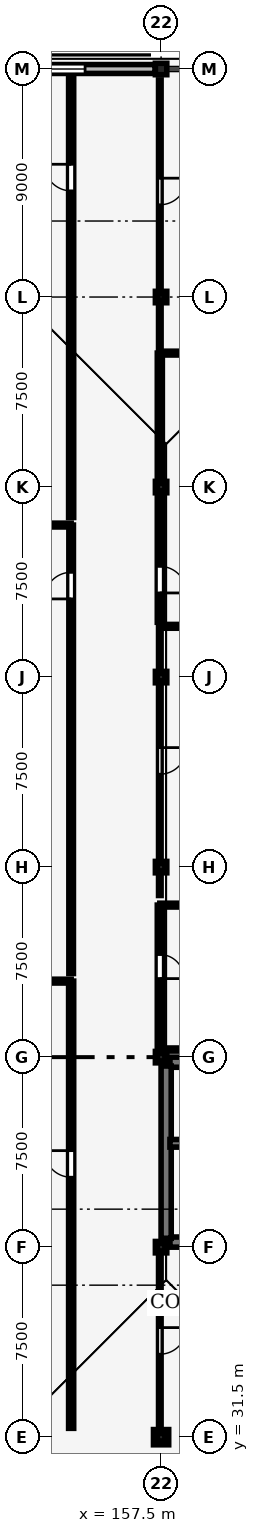
"""IFC4 building model, lengths in metres.
Left out: names, types, materials, properties, quantities, classifications, styles, units other than length and angle.
Written with IfcOpenShell. Run it as: python <this file> out.ifc"""

import sys

from ifc_helpers import new_model, si_unit, direction, frame, frame_2d, origin, origin_2d, place, context, subcontext, project, spatial, rectangle, i_section, extrude, element, fill, save


model = new_model("IFC4")
c1 = context("Model", 3, precision=1e-05, world=origin(), true_north=direction((0.0, 1.0)))
c2 = subcontext(c1, "Body", "Model", "MODEL_VIEW")
j1 = project(units=[si_unit("LENGTHUNIT", "METRE"), si_unit("PLANEANGLEUNIT", "RADIAN")], contexts=[c1])
p1 = place(None, origin())
s1 = spatial("IfcSite", under=j1, at=p1, CompositionType="ELEMENT")
p2 = place(p1, origin())
s2 = spatial("IfcBuilding", under=s1, at=p2, CompositionType="ELEMENT")
p3 = place(p2, frame((0.0, 0.0, 9.3)))
s3 = spatial("IfcBuildingStorey", under=s2, at=p3, CompositionType="ELEMENT", Elevation=9.3)
p4 = place(p3, frame((157.5, 31.5, 0.0), z_axis=(0.0, 0.0, 1.0), x_axis=(1.0, 0.0, 0.0)))
e1 = element("IfcColumn", 1, at=p4, inside=s3, PredefinedType="COLUMN", context=c2, shape_type="SweptSolid", body=[
    extrude(rectangle(XDim=0.6, YDim=0.6, at=origin_2d()), origin(), (0.0, 0.0, 1.0), 4.8),
])
for number, where, z_axis, x_axis in (
    (2, (157.5, 39.0, 0.0), (0.0, 0.0, 1.0), (1.0, 0.0, 0.0)),
    (3, (157.5, 46.5, 0.0), (0.0, 0.0, 1.0), (1.0, 0.0, 0.0)),
    (4, (157.5, 54.0, 0.0), (0.0, 0.0, 1.0), (1.0, 0.0, 0.0)),
    (5, (157.5, 61.5, 0.0), (0.0, 0.0, 1.0), (1.0, 0.0, 0.0)),
    (6, (157.5, 69.0, 0.0), (0.0, 0.0, 1.0), (1.0, 0.0, 0.0)),
    (7, (157.5, 76.5, 0.0), (0.0, 0.0, 1.0), (1.0, 0.0, 0.0)),
    (8, (157.5, 85.5, 0.0), (0.0, 0.0, 1.0), (1.0, 0.0, 0.0)),
):
    element("IfcColumn", number, at=place(p3, frame(where, z_axis=z_axis, x_axis=x_axis)), inside=s3, PredefinedType="COLUMN", context=c2, shape_type="SweptSolid", body=[
        extrude(rectangle(XDim=0.45, YDim=0.45, at=origin_2d()), origin(), (0.0, 0.0, 1.0), 4.8),
    ])
p5 = place(p3, frame((157.5, 31.5, 4.8), z_axis=(0.0, 0.0, 1.0), x_axis=(1.0, 0.0, 0.0)))
e9 = element("IfcColumn", 9, at=p5, inside=s3, PredefinedType="COLUMN", context=c2, shape_type="SweptSolid", body=[
    extrude(i_section(OverallWidth=0.3, OverallDepth=0.3, WebThickness=0.011, FlangeThickness=0.019, FilletRadius=0.027, at=origin_2d()), origin(), (0.0, 0.0, 1.0), 2.24),
])
for number, where, z_axis, x_axis in (
    (10, (157.5, 39.0, 4.8), (0.0, 0.0, 1.0), (1.0, 0.0, 0.0)),
    (11, (157.5, 46.5, 4.8), (0.0, 0.0, 1.0), (1.0, 0.0, 0.0)),
    (12, (157.5, 54.0, 4.8), (0.0, 0.0, 1.0), (1.0, 0.0, 0.0)),
    (13, (157.5, 61.5, 4.8), (0.0, 0.0, 1.0), (1.0, 0.0, 0.0)),
    (14, (157.5, 69.0, 4.8), (0.0, 0.0, 1.0), (1.0, 0.0, 0.0)),
):
    element("IfcColumn", number, at=place(p3, frame(where, z_axis=z_axis, x_axis=x_axis)), inside=s3, PredefinedType="COLUMN", context=c2, shape_type="SweptSolid", body=[
        extrude(i_section(OverallWidth=0.3, OverallDepth=0.3, WebThickness=0.011, FlangeThickness=0.019, FilletRadius=0.027, at=origin_2d()), origin(), (0.0, 0.0, 1.0), 3.714),
    ])
p6 = place(p3, frame((157.5, 76.5, 4.8), z_axis=(0.0, 0.0, 1.0), x_axis=(1.0, 0.0, 0.0)))
e15 = element("IfcColumn", 15, at=p6, inside=s3, PredefinedType="COLUMN", context=c2, shape_type="SweptSolid", body=[
    extrude(i_section(OverallWidth=0.3, OverallDepth=0.3, WebThickness=0.011, FlangeThickness=0.019, FilletRadius=0.027, at=origin_2d()), origin(), (0.0, 0.0, 1.0), 2.338),
])
p7 = place(p3, frame((150.235, 85.5, 0.0), z_axis=(0.0, 0.0, 1.0), x_axis=(1.0, 0.0, 0.0)))
e16 = element("IfcWall", 16, at=p7, inside=s3, PredefinedType="STANDARD", context=c2, shape_type="SweptSolid", body=[
    extrude(rectangle(XDim=7.03, YDim=0.35, at=frame_2d((3.515, 0.0))), origin(), (0.0, 0.0, 1.0), 4.55),
])
p8 = place(p7, frame((2.765, 0.0, 0.9)))
e17 = element("IfcOpeningElement", 17, at=p8, cuts=e16, PredefinedType="OPENING", context=c2, shape_type="SweptSolid", body=[
    extrude(rectangle(XDim=1.5, YDim=2.1, at=frame_2d((0.75, 1.05))), frame((0.0, 0.185, 0.0), z_axis=(0.0, -1.0, 0.0), x_axis=(1.0, 0.0, 0.0)), (0.0, 0.0, 1.0), 0.37),
])
p9 = place(p3, frame((157.85, 39.2, 0.0), z_axis=(0.0, 0.0, 1.0), x_axis=(1.0, 0.0, 0.0)))
e18 = element("IfcWall", 18, at=p9, inside=s3, PredefinedType="SHEAR", context=c2, shape_type="SweptSolid", body=[
    extrude(rectangle(XDim=8.05, YDim=0.4, at=frame_2d((4.025, 0.0))), origin(), (0.0, 0.0, 1.0), 4.55),
])
p10 = place(p3, frame((157.85, 46.3, 0.0), z_axis=(0.0, 0.0, 1.0), x_axis=(1.0, 0.0, 0.0)))
e19 = element("IfcWall", 19, at=p10, inside=s3, PredefinedType="SHEAR", context=c2, shape_type="SweptSolid", body=[
    extrude(rectangle(XDim=14.3, YDim=0.4, at=frame_2d((7.15, 0.0))), origin(), (0.0, 0.0, 1.0), 4.55),
])
p11 = place(p3, frame((157.7, 39.35, 0.0), z_axis=(0.0, 0.0, 1.0), x_axis=(0.0, 1.0, 0.0)))
e20 = element("IfcWall", 20, at=p11, inside=s3, PredefinedType="SHEAR", context=c2, shape_type="SweptSolid", body=[
    extrude(rectangle(XDim=6.8, YDim=0.4, at=frame_2d((3.4, 0.0))), origin(), (0.0, 0.0, 1.0), 4.55),
])
p12 = place(p3, frame((157.85, 43.1, 0.0), z_axis=(0.0, 0.0, 1.0), x_axis=(1.0, 0.0, 0.0)))
e21 = element("IfcWall", 21, at=p12, inside=s3, PredefinedType="SHEAR", context=c2, shape_type="SweptSolid", body=[
    extrude(rectangle(XDim=8.05, YDim=0.3, at=frame_2d((4.025, 0.0))), origin(), (0.0, 0.0, 1.0), 4.55),
])
p13 = place(p3, frame((153.95, 31.85, 0.0), z_axis=(0.0, 0.0, 1.0), x_axis=(0.0, 1.0, 0.0)))
e22 = element("IfcWall", 22, at=p13, inside=s3, PredefinedType="STANDARD", context=c2, shape_type="SweptSolid", body=[
    extrude(rectangle(XDim=17.65, YDim=0.2, at=frame_2d((8.825, 0.0))), origin(), (0.0, 0.0, 1.0), 4.535),
])
p14 = place(p13, frame((9.91, 0.0, 0.0)))
e23 = element("IfcOpeningElement", 23, at=p14, cuts=e22, PredefinedType="OPENING", context=c2, shape_type="SweptSolid", body=[
    extrude(rectangle(XDim=1.05, YDim=2.2, at=frame_2d((0.525, 1.1))), frame((0.0, 0.11, 0.0), z_axis=(0.0, -1.0, 0.0), x_axis=(1.0, 0.0, 0.0)), (0.0, 0.0, 1.0), 0.22),
])
p15 = place(p3, frame((153.95, 49.8, 0.0), z_axis=(0.0, 0.0, 1.0), x_axis=(0.0, 1.0, 0.0)))
e24 = element("IfcWall", 24, at=p15, inside=s3, PredefinedType="PARTITIONING", context=c2, shape_type="SweptSolid", body=[
    extrude(rectangle(XDim=17.7, YDim=0.18, at=frame_2d((8.85, 0.0))), origin(), (0.0, 0.0, 1.0), 4.535),
])
p16 = place(p15, frame((14.785, 0.0, 0.0)))
e25 = element("IfcOpeningElement", 25, at=p16, cuts=e24, PredefinedType="OPENING", context=c2, shape_type="SweptSolid", body=[
    extrude(rectangle(XDim=1.05, YDim=2.2, at=frame_2d((0.525, 1.1))), frame((0.0, 0.1, 0.0), z_axis=(0.0, -1.0, 0.0), x_axis=(1.0, 0.0, 0.0)), (0.0, 0.0, 1.0), 0.2),
])
p17 = place(p3, frame((153.95, 67.8, 0.0), z_axis=(0.0, 0.0, 1.0), x_axis=(0.0, 1.0, 0.0)))
e26 = element("IfcWall", 26, at=p17, inside=s3, PredefinedType="STANDARD", context=c2, shape_type="SweptSolid", body=[
    extrude(rectangle(XDim=17.35, YDim=0.2, at=frame_2d((8.675, 0.0))), origin(), (0.0, 0.0, 1.0), 4.535),
])
p18 = place(p17, frame((12.89, 0.0, 0.0)))
e27 = element("IfcOpeningElement", 27, at=p18, cuts=e26, PredefinedType="OPENING", context=c2, shape_type="SweptSolid", body=[
    extrude(rectangle(XDim=1.05, YDim=2.2, at=frame_2d((0.525, 1.1))), frame((0.0, 0.11, 0.0), z_axis=(0.0, -1.0, 0.0), x_axis=(1.0, 0.0, 0.0)), (0.0, 0.0, 1.0), 0.22),
])
p19 = place(p3, frame((157.45, 38.75, 0.0), z_axis=(0.0, 0.0, 1.0), x_axis=(0.0, -1.0, 0.0)))
e28 = element("IfcWall", 28, at=p19, inside=s3, PredefinedType="PARTITIONING", context=c2, shape_type="SweptSolid", body=[
    extrude(rectangle(XDim=6.9, YDim=0.1, at=frame_2d((3.45, 0.0))), origin(), (0.0, 0.0, 1.0), 4.535),
])
p20 = place(p19, frame((2.925, 0.0, 0.0)))
e29 = element("IfcOpeningElement", 29, at=p20, cuts=e28, PredefinedType="OPENING", context=c2, shape_type="SweptSolid", body=[
    extrude(rectangle(XDim=1.05, YDim=2.2, at=frame_2d((0.525, 1.1))), frame((0.0, 0.06, 0.0), z_axis=(0.0, -1.0, 0.0), x_axis=(1.0, 0.0, 0.0)), (0.0, 0.0, 1.0), 0.12),
])
p21 = place(p3, frame((157.45, 52.5, 0.0), z_axis=(0.0, 0.0, 1.0), x_axis=(0.0, -1.0, 0.0)))
e30 = element("IfcWall", 30, at=p21, inside=s3, PredefinedType="STANDARD", context=c2, shape_type="SweptSolid", body=[
    extrude(rectangle(XDim=5.7, YDim=0.2, at=frame_2d((2.85, 0.0))), origin(), (0.0, 0.0, 1.0), 4.535),
])
p22 = place(p21, frame((1.95, 0.0, 0.0)))
e31 = element("IfcOpeningElement", 31, at=p22, cuts=e30, PredefinedType="OPENING", context=c2, shape_type="SweptSolid", body=[
    extrude(rectangle(XDim=0.95, YDim=2.15, at=frame_2d((0.475, 1.075))), frame((0.0, 0.11, 0.0), z_axis=(0.0, -1.0, 0.0), x_axis=(1.0, 0.0, 0.0)), (0.0, 0.0, 1.0), 0.22),
])
p23 = place(p3, frame((157.45, 63.503, 0.0), z_axis=(0.0, 0.0, 1.0), x_axis=(0.0, -1.0, 0.0)))
e32 = element("IfcWall", 32, at=p23, inside=s3, PredefinedType="PARTITIONING", context=c2, shape_type="SweptSolid", body=[
    extrude(rectangle(XDim=10.624, YDim=0.1, at=frame_2d((5.312, 0.0))), origin(), (0.0, 0.0, 1.0), 4.535),
])
p24 = place(p23, frame((4.787, 0.0, 0.0)))
e33 = element("IfcOpeningElement", 33, at=p24, cuts=e32, PredefinedType="OPENING", context=c2, shape_type="SweptSolid", body=[
    extrude(rectangle(XDim=1.05, YDim=2.2, at=frame_2d((0.525, 1.1))), frame((0.0, 0.06, 0.0), z_axis=(0.0, -1.0, 0.0), x_axis=(1.0, 0.0, 0.0)), (0.0, 0.0, 1.0), 0.12),
])
p25 = place(p3, frame((157.45, 74.287, 0.0), z_axis=(0.0, 0.0, 1.0), x_axis=(0.0, -1.0, 0.0)))
e34 = element("IfcWall", 34, at=p25, inside=s3, PredefinedType="STANDARD", context=c2, shape_type="SweptSolid", body=[
    extrude(rectangle(XDim=10.623, YDim=0.2, at=frame_2d((5.312, 0.0))), origin(), (0.0, 0.0, 1.0), 4.535),
])
p26 = place(p25, frame((8.416, 0.0, 0.0)))
e35 = element("IfcOpeningElement", 35, at=p26, cuts=e34, PredefinedType="OPENING", context=c2, shape_type="SweptSolid", body=[
    extrude(rectangle(XDim=1.05, YDim=2.2, at=frame_2d((0.525, 1.1))), frame((0.0, 0.11, 0.0), z_axis=(0.0, -1.0, 0.0), x_axis=(1.0, 0.0, 0.0)), (0.0, 0.0, 1.0), 0.22),
])
p27 = place(p3, frame((157.45, 85.07, 0.0), z_axis=(0.0, 0.0, 1.0), x_axis=(0.0, -1.0, 0.0)))
e36 = element("IfcWall", 36, at=p27, inside=s3, PredefinedType="PARTITIONING", context=c2, shape_type="SweptSolid", body=[
    extrude(rectangle(XDim=10.623, YDim=0.1, at=frame_2d((5.312, 0.0))), origin(), (0.0, 0.0, 1.0), 4.535),
])
p28 = place(p27, frame((3.879, 0.0, 0.0)))
e37 = element("IfcOpeningElement", 37, at=p28, cuts=e36, PredefinedType="OPENING", context=c2, shape_type="SweptSolid", body=[
    extrude(rectangle(XDim=1.05, YDim=2.2, at=frame_2d((0.525, 1.1))), frame((0.0, 0.06, 0.0), z_axis=(0.0, -1.0, 0.0), x_axis=(1.0, 0.0, 0.0)), (0.0, 0.0, 1.0), 0.12),
])
for number, where, z_axis, x_axis in (
    (38, (142.85, 49.5, 0.0), (0.0, 0.0, 1.0), (1.0, 0.0, 0.0)),
    (39, (142.85, 67.5, 0.0), (0.0, 0.0, 1.0), (1.0, 0.0, 0.0)),
):
    element("IfcWall", number, at=place(p3, frame(where, z_axis=z_axis, x_axis=x_axis)), inside=s3, PredefinedType="PARTITIONING", context=c2, shape_type="SweptSolid", body=[
        extrude(rectangle(XDim=11.1, YDim=0.15, at=frame_2d((5.55, 0.0))), origin(), (0.0, 0.0, 1.0), 4.535),
    ])
for number, where, z_axis, x_axis in (
    (40, (157.45, 52.5, 0.0), (0.0, 0.0, 1.0), (1.0, 0.0, 0.0)),
    (41, (157.45, 63.503, 0.0), (0.0, 0.0, 1.0), (1.0, 0.0, 0.0)),
    (42, (157.45, 74.287, 0.0), (0.0, 0.0, 1.0), (1.0, 0.0, 0.0)),
):
    element("IfcWall", number, at=place(p3, frame(where, z_axis=z_axis, x_axis=x_axis)), inside=s3, PredefinedType="PARTITIONING", context=c2, shape_type="SweptSolid", body=[
        extrude(rectangle(XDim=14.7, YDim=0.15, at=frame_2d((7.35, 0.0))), origin(), (0.0, 0.0, 1.0), 4.535),
    ])
p29 = place(p3, frame((157.775, 46.8, 0.0), z_axis=(0.0, 0.0, 1.0), x_axis=(1.0, 0.0, 0.0)))
e43 = element("IfcWall", 43, at=p29, inside=s3, PredefinedType="PARTITIONING", context=c2, shape_type="SweptSolid", body=[
    extrude(rectangle(XDim=14.375, YDim=0.12, at=frame_2d((7.188, 0.0))), origin(), (0.0, 0.0, 1.0), 4.535),
])
p30 = place(p8, origin())
e44 = element("IfcWindow", 44, at=p30, inside=s3, PartitioningType="SINGLE_PANEL", PredefinedType="WINDOW", context=c2, shape_type="SweptSolid", body=[
    extrude(rectangle(XDim=1.5, YDim=2.1, at=frame_2d((0.75, 1.05))), frame((0.0, 0.03, 0.0), z_axis=(0.0, -1.0, 0.0), x_axis=(1.0, 0.0, 0.0)), (0.0, 0.0, 1.0), 0.06),
])
fill(e17, e44)
p31 = place(p14, origin())
e45 = element("IfcDoor", 45, at=p31, inside=s3, OperationType="SINGLE_SWING_RIGHT", PredefinedType="DOOR", context=c2, shape_type="SweptSolid", body=[
    extrude(rectangle(XDim=1.05, YDim=2.2, at=frame_2d((0.525, 1.1))), frame((0.0, 0.025, 0.0), z_axis=(0.0, -1.0, 0.0), x_axis=(1.0, 0.0, 0.0)), (0.0, 0.0, 1.0), 0.05),
])
fill(e23, e45)
p32 = place(p16, origin())
e46 = element("IfcDoor", 46, at=p32, inside=s3, OperationType="SINGLE_SWING_LEFT", PredefinedType="DOOR", context=c2, shape_type="SweptSolid", body=[
    extrude(rectangle(XDim=1.05, YDim=2.2, at=frame_2d((0.525, 1.1))), frame((0.0, 0.025, 0.0), z_axis=(0.0, -1.0, 0.0), x_axis=(1.0, 0.0, 0.0)), (0.0, 0.0, 1.0), 0.05),
])
fill(e25, e46)
p33 = place(p18, origin())
e47 = element("IfcDoor", 47, at=p33, inside=s3, OperationType="SINGLE_SWING_RIGHT", PredefinedType="DOOR", context=c2, shape_type="SweptSolid", body=[
    extrude(rectangle(XDim=1.05, YDim=2.2, at=frame_2d((0.525, 1.1))), frame((0.0, 0.025, 0.0), z_axis=(0.0, -1.0, 0.0), x_axis=(1.0, 0.0, 0.0)), (0.0, 0.0, 1.0), 0.05),
])
fill(e27, e47)
p34 = place(p20, origin())
e48 = element("IfcDoor", 48, at=p34, inside=s3, OperationType="SINGLE_SWING_LEFT", PredefinedType="DOOR", context=c2, shape_type="SweptSolid", body=[
    extrude(rectangle(XDim=1.05, YDim=2.2, at=frame_2d((0.525, 1.1))), frame((0.0, 0.025, 0.0), z_axis=(0.0, -1.0, 0.0), x_axis=(1.0, 0.0, 0.0)), (0.0, 0.0, 1.0), 0.05),
])
fill(e29, e48)
p35 = place(p22, origin())
e49 = element("IfcDoor", 49, at=p35, inside=s3, OperationType="SINGLE_SWING_RIGHT", PredefinedType="DOOR", context=c2, shape_type="SweptSolid", body=[
    extrude(rectangle(XDim=0.95, YDim=2.15, at=frame_2d((0.475, 1.075))), frame((0.0, 0.025, 0.0), z_axis=(0.0, -1.0, 0.0), x_axis=(1.0, 0.0, 0.0)), (0.0, 0.0, 1.0), 0.05),
])
fill(e31, e49)
p36 = place(p24, origin())
e50 = element("IfcDoor", 50, at=p36, inside=s3, OperationType="SINGLE_SWING_LEFT", PredefinedType="DOOR", context=c2, shape_type="SweptSolid", body=[
    extrude(rectangle(XDim=1.05, YDim=2.2, at=frame_2d((0.525, 1.1))), frame((0.0, 0.025, 0.0), z_axis=(0.0, -1.0, 0.0), x_axis=(1.0, 0.0, 0.0)), (0.0, 0.0, 1.0), 0.05),
])
fill(e33, e50)
p37 = place(p26, origin())
e51 = element("IfcDoor", 51, at=p37, inside=s3, OperationType="SINGLE_SWING_RIGHT", PredefinedType="DOOR", context=c2, shape_type="SweptSolid", body=[
    extrude(rectangle(XDim=1.05, YDim=2.2, at=frame_2d((0.525, 1.1))), frame((0.0, 0.025, 0.0), z_axis=(0.0, -1.0, 0.0), x_axis=(1.0, 0.0, 0.0)), (0.0, 0.0, 1.0), 0.05),
])
fill(e35, e51)
p38 = place(p28, origin())
e52 = element("IfcDoor", 52, at=p38, inside=s3, OperationType="SINGLE_SWING_LEFT", PredefinedType="DOOR", context=c2, shape_type="SweptSolid", body=[
    extrude(rectangle(XDim=1.05, YDim=2.2, at=frame_2d((0.525, 1.1))), frame((0.0, 0.025, 0.0), z_axis=(0.0, -1.0, 0.0), x_axis=(1.0, 0.0, 0.0)), (0.0, 0.0, 1.0), 0.05),
])
fill(e37, e52)
save(model, sys.argv[1])
